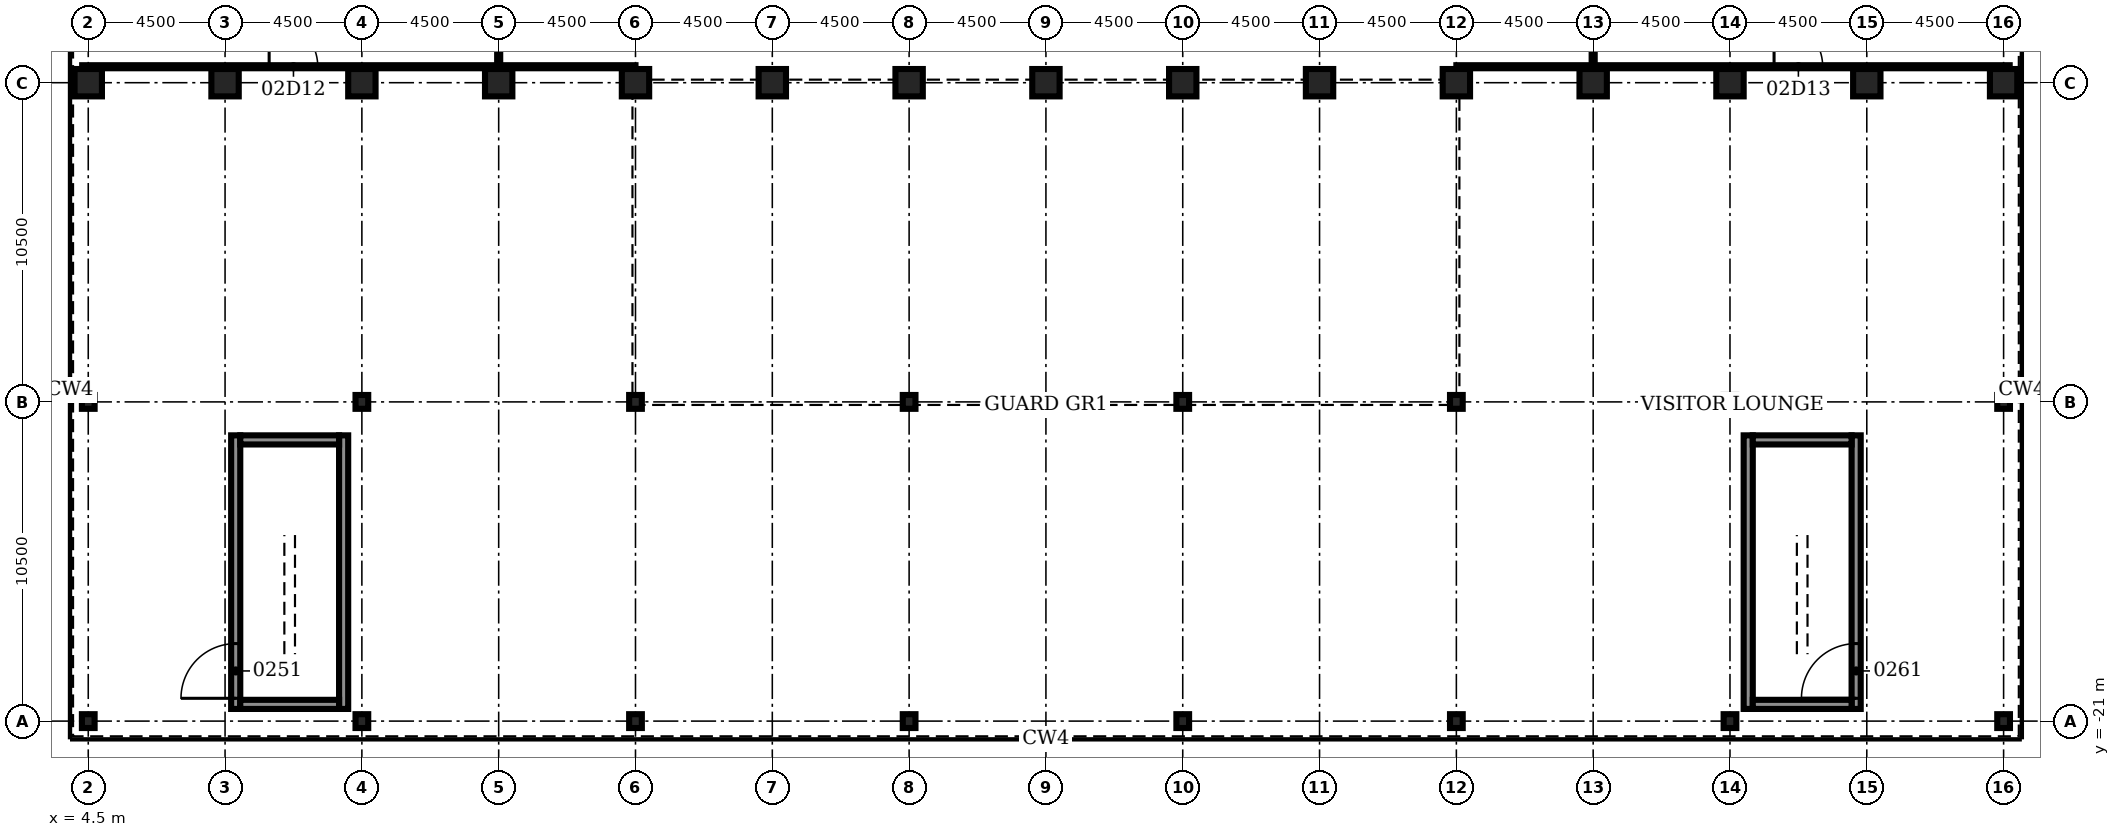
"""IFC4 building model, lengths in metres.
Left out: names, types, materials, properties, quantities, classifications, styles, units other than length and angle.
Written with IfcOpenShell. Run it as: python <this file> out.ifc"""

import sys

from ifc_helpers import new_model, si_unit, direction, frame, frame_2d, origin, origin_2d, place, context, subcontext, project, spatial, rectangle, hollow_rectangle, i_section, extrude, element, fill, save


model = new_model("IFC4")
c1 = context("Model", 3, precision=1e-05, world=origin(), true_north=direction((0.0, 1.0)))
c2 = subcontext(c1, "Body", "Model", "MODEL_VIEW")
j1 = project(units=[si_unit("LENGTHUNIT", "METRE"), si_unit("PLANEANGLEUNIT", "RADIAN")], contexts=[c1])
p1 = place(None, origin())
s1 = spatial("IfcSite", under=j1, at=p1, CompositionType="ELEMENT")
p2 = place(p1, origin())
s2 = spatial("IfcBuilding", under=s1, at=p2, CompositionType="ELEMENT")
p3 = place(p2, frame((0.0, 0.0, 13.0)))
s3 = spatial("IfcBuildingStorey", under=s2, at=p3, CompositionType="ELEMENT", Elevation=13.0)
for number, where, z_axis, x_axis in (
    (1, (4.5, 0.0, 0.0), (0.0, 0.0, 1.0), (0.0, 1.0, 0.0)),
    (2, (9.0, 0.0, 0.0), (0.0, 0.0, 1.0), (0.0, 1.0, 0.0)),
    (3, (13.5, 0.0, 0.0), (0.0, 0.0, 1.0), (0.0, 1.0, 0.0)),
    (4, (18.0, 0.0, 0.0), (0.0, 0.0, 1.0), (0.0, 1.0, 0.0)),
    (5, (22.5, 0.0, 0.0), (0.0, 0.0, 1.0), (0.0, 1.0, 0.0)),
    (6, (27.0, 0.0, 0.0), (0.0, 0.0, 1.0), (0.0, 1.0, 0.0)),
    (7, (31.5, 0.0, 0.0), (0.0, 0.0, 1.0), (0.0, 1.0, 0.0)),
    (8, (36.0, 0.0, 0.0), (0.0, 0.0, 1.0), (0.0, 1.0, 0.0)),
    (9, (40.5, 0.0, 0.0), (0.0, 0.0, 1.0), (0.0, 1.0, 0.0)),
    (10, (45.0, 0.0, 0.0), (0.0, 0.0, 1.0), (0.0, 1.0, 0.0)),
    (11, (49.5, 0.0, 0.0), (0.0, 0.0, 1.0), (0.0, 1.0, 0.0)),
    (12, (54.0, 0.0, 0.0), (0.0, 0.0, 1.0), (0.0, 1.0, 0.0)),
    (13, (58.5, 0.0, 0.0), (0.0, 0.0, 1.0), (0.0, 1.0, 0.0)),
    (14, (63.0, 0.0, 0.0), (0.0, 0.0, 1.0), (0.0, 1.0, 0.0)),
    (15, (67.5, 0.0, 0.0), (0.0, 0.0, 1.0), (0.0, 1.0, 0.0)),
):
    element("IfcColumn", number, at=place(p3, frame(where, z_axis=z_axis, x_axis=x_axis)), inside=s3, PredefinedType="COLUMN", context=c2, shape_type="SweptSolid", body=[
        extrude(hollow_rectangle(XDim=0.9, YDim=0.9, WallThickness=0.12, at=origin_2d()), origin(), (0.0, 0.0, 1.0), 5.0),
    ])
for number, where, z_axis, x_axis in (
    (16, (4.5, -21.0, 0.0), (0.0, 0.0, 1.0), (1.0, 0.0, 0.0)),
    (17, (4.5, -10.5, 0.0), (0.0, 0.0, 1.0), (1.0, 0.0, 0.0)),
    (18, (13.5, -21.0, 0.0), (0.0, 0.0, 1.0), (1.0, 0.0, 0.0)),
    (19, (13.5, -10.5, 0.0), (0.0, 0.0, 1.0), (1.0, 0.0, 0.0)),
    (20, (22.5, -21.0, 0.0), (0.0, 0.0, 1.0), (1.0, 0.0, 0.0)),
    (21, (22.5, -10.5, 0.0), (0.0, 0.0, 1.0), (1.0, 0.0, 0.0)),
    (22, (31.5, -21.0, 0.0), (0.0, 0.0, 1.0), (1.0, 0.0, 0.0)),
    (23, (31.5, -10.5, 0.0), (0.0, 0.0, 1.0), (1.0, 0.0, 0.0)),
    (24, (40.5, -21.0, 0.0), (0.0, 0.0, 1.0), (1.0, 0.0, 0.0)),
    (25, (40.5, -10.5, 0.0), (0.0, 0.0, 1.0), (1.0, 0.0, 0.0)),
    (26, (49.5, -21.0, 0.0), (0.0, 0.0, 1.0), (1.0, 0.0, 0.0)),
    (27, (49.5, -10.5, 0.0), (0.0, 0.0, 1.0), (1.0, 0.0, 0.0)),
    (28, (58.5, -21.0, 0.0), (0.0, 0.0, 1.0), (1.0, 0.0, 0.0)),
    (29, (58.5, -10.5, 0.0), (0.0, 0.0, 1.0), (1.0, 0.0, 0.0)),
    (30, (67.5, -21.0, 0.0), (0.0, 0.0, 1.0), (1.0, 0.0, 0.0)),
    (31, (67.5, -10.5, 0.0), (0.0, 0.0, 1.0), (1.0, 0.0, 0.0)),
):
    element("IfcColumn", number, at=place(p3, frame(where, z_axis=z_axis, x_axis=x_axis)), inside=s3, PredefinedType="COLUMN", context=c2, shape_type="SweptSolid", body=[
        extrude(i_section(OverallWidth=0.418, OverallDepth=0.455, WebThickness=0.042, FlangeThickness=0.068, at=origin_2d()), origin(), (0.0, 0.0, 1.0), 5.0),
    ])
p4 = place(p3, frame((18.0, 0.575, 0.0), z_axis=(0.0, 0.0, 1.0), x_axis=(0.0, 1.0, 0.0)))
e32 = element("IfcWall", 32, at=p4, inside=s3, PredefinedType="PARTITIONING", context=c2, shape_type="SweptSolid", body=[
    extrude(rectangle(XDim=14.975, YDim=0.1, at=frame_2d((7.488, 0.0))), origin(), (0.0, 0.0, 1.0), 3.0),
])
p5 = place(p4, frame((2.944, 0.0, 0.0)))
e33 = element("IfcOpeningElement", 33, at=p5, cuts=e32, PredefinedType="OPENING", context=c2, shape_type="SweptSolid", body=[
    extrude(rectangle(XDim=1.6, YDim=2.1, at=frame_2d((0.8, 1.05))), frame((0.0, 0.06, 0.0), z_axis=(0.0, -1.0, 0.0), x_axis=(1.0, 0.0, 0.0)), (0.0, 0.0, 1.0), 0.12),
])
p6 = place(p4, frame((10.431, 0.0, 0.0)))
e34 = element("IfcOpeningElement", 34, at=p6, cuts=e32, PredefinedType="OPENING", context=c2, shape_type="SweptSolid", body=[
    extrude(rectangle(XDim=1.6, YDim=2.1, at=frame_2d((0.8, 1.05))), frame((0.0, 0.06, 0.0), z_axis=(0.0, -1.0, 0.0), x_axis=(1.0, 0.0, 0.0)), (0.0, 0.0, 1.0), 0.12),
])
p7 = place(p3, frame((54.0, 0.575, 0.0), z_axis=(0.0, 0.0, 1.0), x_axis=(0.0, 1.0, 0.0)))
e35 = element("IfcWall", 35, at=p7, inside=s3, PredefinedType="PARTITIONING", context=c2, shape_type="SweptSolid", body=[
    extrude(rectangle(XDim=14.975, YDim=0.1, at=frame_2d((7.488, 0.0))), origin(), (0.0, 0.0, 1.0), 3.0),
])
p8 = place(p7, frame((2.944, 0.0, 0.0)))
e36 = element("IfcOpeningElement", 36, at=p8, cuts=e35, PredefinedType="OPENING", context=c2, shape_type="SweptSolid", body=[
    extrude(rectangle(XDim=1.6, YDim=2.1, at=frame_2d((0.8, 1.05))), frame((0.0, 0.06, 0.0), z_axis=(0.0, -1.0, 0.0), x_axis=(1.0, 0.0, 0.0)), (0.0, 0.0, 1.0), 0.12),
])
p9 = place(p7, frame((10.431, 0.0, 0.0)))
e37 = element("IfcOpeningElement", 37, at=p9, cuts=e35, PredefinedType="OPENING", context=c2, shape_type="SweptSolid", body=[
    extrude(rectangle(XDim=1.6, YDim=2.1, at=frame_2d((0.8, 1.05))), frame((0.0, 0.06, 0.0), z_axis=(0.0, -1.0, 0.0), x_axis=(1.0, 0.0, 0.0)), (0.0, 0.0, 1.0), 0.12),
])
p10 = place(p3, frame((4.3, 0.525, 0.0), z_axis=(0.0, 0.0, 1.0), x_axis=(1.0, 0.0, 0.0)))
e38 = element("IfcWall", 38, at=p10, inside=s3, PredefinedType="PARTITIONING", context=c2, shape_type="SweptSolid", body=[
    extrude(rectangle(XDim=18.2, YDim=0.1, at=frame_2d((9.1, 0.0))), origin(), (0.0, 0.0, 1.0), 3.0),
])
p11 = place(p10, frame((6.15, 0.0, 0.0)))
e39 = element("IfcOpeningElement", 39, at=p11, cuts=e38, PredefinedType="OPENING", context=c2, shape_type="SweptSolid", body=[
    extrude(rectangle(XDim=1.6, YDim=2.1, at=frame_2d((0.8, 1.05))), frame((0.0, 0.06, 0.0), z_axis=(0.0, -1.0, 0.0), x_axis=(1.0, 0.0, 0.0)), (0.0, 0.0, 1.0), 0.12),
])
p12 = place(p3, frame((49.5, 0.525, 0.0), z_axis=(0.0, 0.0, 1.0), x_axis=(1.0, 0.0, 0.0)))
e40 = element("IfcWall", 40, at=p12, inside=s3, PredefinedType="PARTITIONING", context=c2, shape_type="SweptSolid", body=[
    extrude(rectangle(XDim=18.2, YDim=0.1, at=frame_2d((9.1, 0.0))), origin(), (0.0, 0.0, 1.0), 3.0),
])
p13 = place(p12, frame((10.45, 0.0, 0.0)))
e41 = element("IfcOpeningElement", 41, at=p13, cuts=e40, PredefinedType="OPENING", context=c2, shape_type="SweptSolid", body=[
    extrude(rectangle(XDim=1.6, YDim=2.1, at=frame_2d((0.8, 1.05))), frame((0.0, 0.06, 0.0), z_axis=(0.0, -1.0, 0.0), x_axis=(1.0, 0.0, 0.0)), (0.0, 0.0, 1.0), 0.12),
])
p14 = place(p3, frame((9.35, -20.6, 0.0), z_axis=(0.0, 0.0, 1.0), x_axis=(0.0, 1.0, 0.0)))
e42 = element("IfcWall", 42, at=p14, inside=s3, PredefinedType="SOLIDWALL", context=c2, shape_type="SweptSolid", body=[
    extrude(rectangle(XDim=9.0, YDim=0.3, at=frame_2d((4.5, 0.0))), origin(), (0.0, 0.0, 1.0), 5.0),
])
p15 = place(p14, frame((0.35, 0.0, 0.0)))
e43 = element("IfcOpeningElement", 43, at=p15, cuts=e42, PredefinedType="OPENING", context=c2, shape_type="SweptSolid", body=[
    extrude(rectangle(XDim=1.8, YDim=2.1, at=frame_2d((0.9, 1.05))), frame((0.0, 0.16, 0.0), z_axis=(0.0, -1.0, 0.0), x_axis=(1.0, 0.0, 0.0)), (0.0, 0.0, 1.0), 0.32),
])
p16 = place(p3, frame((12.9, -20.6, 0.0), z_axis=(0.0, 0.0, 1.0), x_axis=(0.0, 1.0, 0.0)))
e44 = element("IfcWall", 44, at=p16, inside=s3, PredefinedType="SOLIDWALL", context=c2, shape_type="SweptSolid", body=[
    extrude(rectangle(XDim=9.0, YDim=0.3, at=frame_2d((4.5, 0.0))), origin(), (0.0, 0.0, 1.0), 5.0),
])
for number, where, z_axis, x_axis in (
    (45, (9.5, -20.45, 0.0), (0.0, 0.0, 1.0), (1.0, 0.0, 0.0)),
    (46, (9.5, -11.75, 0.0), (0.0, 0.0, 1.0), (1.0, 0.0, 0.0)),
):
    element("IfcWall", number, at=place(p3, frame(where, z_axis=z_axis, x_axis=x_axis)), inside=s3, PredefinedType="SOLIDWALL", context=c2, shape_type="SweptSolid", body=[
        extrude(rectangle(XDim=3.25, YDim=0.3, at=frame_2d((1.625, 0.0))), origin(), (0.0, 0.0, 1.0), 5.0),
    ])
p17 = place(p3, frame((59.1, -20.6, 0.0), z_axis=(0.0, 0.0, 1.0), x_axis=(0.0, 1.0, 0.0)))
e47 = element("IfcWall", 47, at=p17, inside=s3, PredefinedType="SOLIDWALL", context=c2, shape_type="SweptSolid", body=[
    extrude(rectangle(XDim=9.0, YDim=0.3, at=frame_2d((4.5, 0.0))), origin(), (0.0, 0.0, 1.0), 5.0),
])
p18 = place(p3, frame((62.65, -20.6, 0.0), z_axis=(0.0, 0.0, 1.0), x_axis=(0.0, 1.0, 0.0)))
e48 = element("IfcWall", 48, at=p18, inside=s3, PredefinedType="SOLIDWALL", context=c2, shape_type="SweptSolid", body=[
    extrude(rectangle(XDim=9.0, YDim=0.3, at=frame_2d((4.5, 0.0))), origin(), (0.0, 0.0, 1.0), 5.0),
])
p19 = place(p18, frame((0.35, 0.0, 0.0)))
e49 = element("IfcOpeningElement", 49, at=p19, cuts=e48, PredefinedType="OPENING", context=c2, shape_type="SweptSolid", body=[
    extrude(rectangle(XDim=1.8, YDim=2.1, at=frame_2d((0.9, 1.05))), frame((0.0, 0.16, 0.0), z_axis=(0.0, -1.0, 0.0), x_axis=(1.0, 0.0, 0.0)), (0.0, 0.0, 1.0), 0.32),
])
for number, where, z_axis, x_axis in (
    (50, (59.25, -20.45, 0.0), (0.0, 0.0, 1.0), (1.0, 0.0, 0.0)),
    (51, (59.25, -11.75, 0.0), (0.0, 0.0, 1.0), (1.0, 0.0, 0.0)),
):
    element("IfcWall", number, at=place(p3, frame(where, z_axis=z_axis, x_axis=x_axis)), inside=s3, PredefinedType="SOLIDWALL", context=c2, shape_type="SweptSolid", body=[
        extrude(rectangle(XDim=3.25, YDim=0.3, at=frame_2d((1.625, 0.0))), origin(), (0.0, 0.0, 1.0), 5.0),
    ])
p20 = place(p11, origin())
e52 = element("IfcDoor", 52, at=p20, inside=s3, OperationType="SINGLE_SWING_LEFT", PredefinedType="DOOR", context=c2, shape_type="SweptSolid", body=[
    extrude(rectangle(XDim=1.6, YDim=2.1, at=frame_2d((0.8, 1.05))), frame((0.0, 0.025, 0.0), z_axis=(0.0, -1.0, 0.0), x_axis=(1.0, 0.0, 0.0)), (0.0, 0.0, 1.0), 0.05),
])
fill(e39, e52)
p21 = place(p13, origin())
e53 = element("IfcDoor", 53, at=p21, inside=s3, OperationType="SINGLE_SWING_LEFT", PredefinedType="DOOR", context=c2, shape_type="SweptSolid", body=[
    extrude(rectangle(XDim=1.6, YDim=2.1, at=frame_2d((0.8, 1.05))), frame((0.0, 0.025, 0.0), z_axis=(0.0, -1.0, 0.0), x_axis=(1.0, 0.0, 0.0)), (0.0, 0.0, 1.0), 0.05),
])
fill(e41, e53)
p22 = place(p15, origin())
e54 = element("IfcDoor", 54, at=p22, inside=s3, OperationType="SINGLE_SWING_LEFT", PredefinedType="DOOR", context=c2, shape_type="SweptSolid", body=[
    extrude(rectangle(XDim=1.8, YDim=2.1, at=frame_2d((0.9, 1.05))), frame((0.0, 0.025, 0.0), z_axis=(0.0, -1.0, 0.0), x_axis=(1.0, 0.0, 0.0)), (0.0, 0.0, 1.0), 0.05),
])
fill(e43, e54)
p23 = place(p19, origin())
e55 = element("IfcDoor", 55, at=p23, inside=s3, OperationType="SINGLE_SWING_LEFT", PredefinedType="DOOR", context=c2, shape_type="SweptSolid", body=[
    extrude(rectangle(XDim=1.8, YDim=2.1, at=frame_2d((0.9, 1.05))), frame((0.0, 0.025, 0.0), z_axis=(0.0, -1.0, 0.0), x_axis=(1.0, 0.0, 0.0)), (0.0, 0.0, 1.0), 0.05),
])
fill(e49, e55)
save(model, sys.argv[1])
